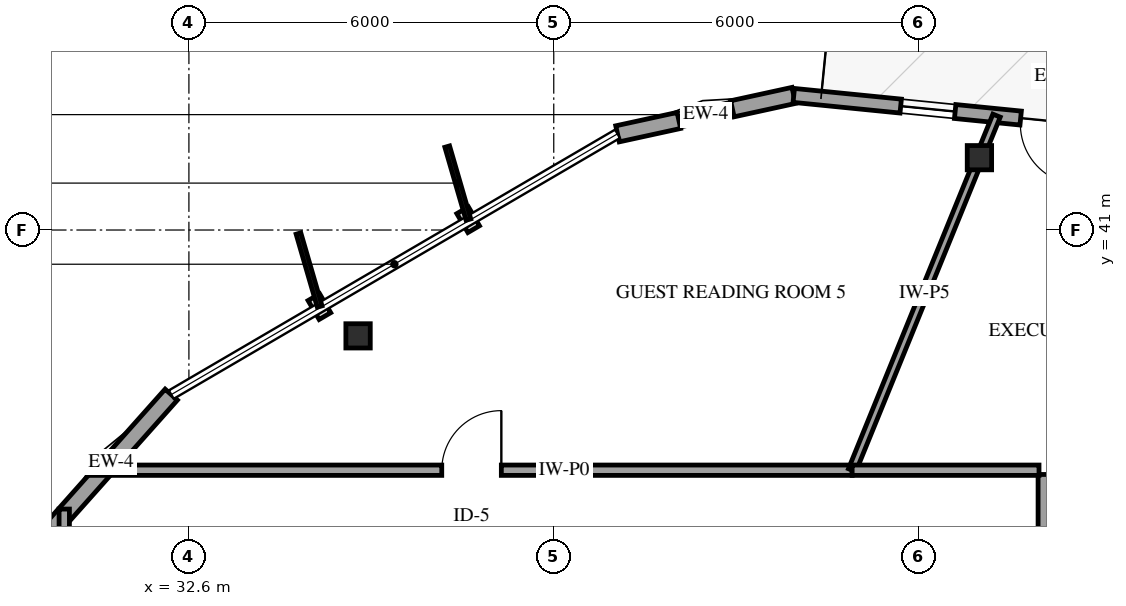
"""IFC4 building model, lengths in metres.
Left out: names, types, materials, properties, quantities, classifications, styles, units other than length and angle.
Written with IfcOpenShell. Run it as: python <this file> out.ifc"""

import sys

from ifc_helpers import new_model, si_unit, direction, frame, frame_2d, origin, origin_2d, place, context, subcontext, project, spatial, rectangle, i_section, extrude, element, fill, save


model = new_model("IFC4")
c1 = context("Model", 3, precision=1e-05, world=origin(), true_north=direction((0.0, 1.0)))
c2 = subcontext(c1, "Body", "Model", "MODEL_VIEW")
j1 = project(units=[si_unit("LENGTHUNIT", "METRE"), si_unit("PLANEANGLEUNIT", "RADIAN")], contexts=[c1])
p1 = place(None, origin())
s1 = spatial("IfcSite", under=j1, at=p1, CompositionType="ELEMENT")
p2 = place(p1, origin())
s2 = spatial("IfcBuilding", under=s1, at=p2, CompositionType="ELEMENT")
p3 = place(p2, frame((0.0, 0.0, 276.25)))
s3 = spatial("IfcBuildingStorey", under=s2, at=p3, CompositionType="ELEMENT", Elevation=276.25)
for number, where, z_axis, x_axis in (
    (1, (45.6, 42.189, 0.0), (0.0, 0.0, 1.0), (1.0, 0.0, 0.0)),
    (2, (35.382, 39.26, 0.0), (0.0, 0.0, 1.0), (1.0, 0.0, 0.0)),
):
    element("IfcColumn", number, at=place(p3, frame(where, z_axis=z_axis, x_axis=x_axis)), inside=s3, PredefinedType="COLUMN", context=c2, shape_type="SweptSolid", body=[
        extrude(i_section(OverallWidth=0.401, OverallDepth=0.399, WebThickness=0.025, FlangeThickness=0.04, FilletRadius=0.038, at=origin_2d()), origin(), (0.0, 0.0, 1.0), 3.75),
    ])
p4 = place(p3, frame((42.547, 43.214, 0.0), z_axis=(0.0, 0.0, 1.0), x_axis=(-0.977037259255, -0.21306851956, 0.0)))
e3 = element("IfcWall", 3, at=p4, inside=s3, PredefinedType="SOLIDWALL", context=c2, shape_type="SweptSolid", body=[
    extrude(rectangle(XDim=2.967, YDim=0.27, at=frame_2d((1.483, 0.0))), origin(), (0.0, 0.0, 1.0), 2.829),
])
p5 = place(p4, frame((1.033, 0.0, 0.75)))
e4 = element("IfcOpeningElement", 4, at=p5, cuts=e3, PredefinedType="OPENING", context=c2, shape_type="SweptSolid", body=[
    extrude(rectangle(XDim=0.9, YDim=1.5, at=frame_2d((0.45, 0.75))), frame((0.0, 0.145, 0.0), z_axis=(0.0, -1.0, 0.0), x_axis=(1.0, 0.0, 0.0)), (0.0, 0.0, 1.0), 0.29),
])
p6 = place(p3, frame((51.005, 42.369, 0.0), z_axis=(0.0, 0.0, 1.0), x_axis=(-0.995055090482, 0.099324553384, 0.0)))
e5 = element("IfcWall", 5, at=p6, inside=s3, PredefinedType="SOLIDWALL", context=c2, shape_type="SweptSolid", body=[
    extrude(rectangle(XDim=8.5, YDim=0.23, at=frame_2d((4.25, 0.0))), origin(), (0.0, 0.0, 1.0), 2.829),
])
p7 = place(p6, frame((3.75, 0.0, 0.0)))
e6 = element("IfcOpeningElement", 6, at=p7, cuts=e5, PredefinedType="OPENING", context=c2, shape_type="SweptSolid", body=[
    extrude(rectangle(XDim=1.0, YDim=2.15, at=frame_2d((0.5, 1.075))), frame((0.0, 0.125, 0.0), z_axis=(0.0, -1.0, 0.0), x_axis=(1.0, 0.0, 0.0)), (0.0, 0.0, 1.0), 0.25),
])
p8 = place(p6, frame((0.44, 0.0, 0.72)))
e7 = element("IfcOpeningElement", 7, at=p8, cuts=e5, PredefinedType="OPENING", context=c2, shape_type="SweptSolid", body=[
    extrude(rectangle(XDim=0.9, YDim=1.5, at=frame_2d((0.45, 0.75))), frame((0.0, 0.125, 0.0), z_axis=(0.0, -1.0, 0.0), x_axis=(1.0, 0.0, 0.0)), (0.0, 0.0, 1.0), 0.25),
])
p9 = place(p6, frame((5.833, 0.0, 0.72)))
e8 = element("IfcOpeningElement", 8, at=p9, cuts=e5, PredefinedType="OPENING", context=c2, shape_type="SweptSolid", body=[
    extrude(rectangle(XDim=0.9, YDim=1.5, at=frame_2d((0.45, 0.75))), frame((0.0, 0.125, 0.0), z_axis=(0.0, -1.0, 0.0), x_axis=(1.0, 0.0, 0.0)), (0.0, 0.0, 1.0), 0.25),
])
p10 = place(p3, frame((32.31, 38.293, 0.0), z_axis=(0.0, 0.0, 1.0), x_axis=(-0.665241909174, -0.746627887424, 0.0)))
e9 = element("IfcWall", 9, at=p10, inside=s3, PredefinedType="SOLIDWALL", context=c2, shape_type="SweptSolid", body=[
    extrude(rectangle(XDim=2.967, YDim=0.27, at=frame_2d((1.483, 0.0))), origin(), (0.0, 0.0, 1.0), 2.829),
])
p11 = place(p3, frame((30.55, 13.927, 0.0), z_axis=(0.0, 0.0, 1.0), x_axis=(0.0, 1.0, 0.0)))
e10 = element("IfcWall", 10, at=p11, inside=s3, PredefinedType="PARTITIONING", context=c2, shape_type="SweptSolid", body=[
    extrude(rectangle(XDim=22.484, YDim=0.17, at=frame_2d((11.242, 0.0))), origin(), (0.0, 0.0, 1.0), 3.45),
])
p12 = place(p11, frame((10.767, 0.0, 0.0)))
e11 = element("IfcOpeningElement", 11, at=p12, cuts=e10, PredefinedType="OPENING", context=c2, shape_type="SweptSolid", body=[
    extrude(rectangle(XDim=0.98, YDim=2.15, at=frame_2d((0.49, 1.075))), frame((0.0, 0.095, 0.0), z_axis=(0.0, -1.0, 0.0), x_axis=(1.0, 0.0, 0.0)), (0.0, 0.0, 1.0), 0.19),
])
p13 = place(p3, frame((30.96, 37.05, 0.0), z_axis=(0.0, 0.0, 1.0), x_axis=(1.0, 0.0, 0.0)))
e12 = element("IfcWall", 12, at=p13, inside=s3, PredefinedType="PARTITIONING", context=c2, shape_type="SweptSolid", body=[
    extrude(rectangle(XDim=12.547, YDim=0.17, at=frame_2d((6.273, 0.0))), origin(), (0.0, 0.0, 1.0), 3.45),
])
p14 = place(p13, frame((5.798, 0.0, 0.0)))
e13 = element("IfcOpeningElement", 13, at=p14, cuts=e12, PredefinedType="OPENING", context=c2, shape_type="SweptSolid", body=[
    extrude(rectangle(XDim=0.98, YDim=2.15, at=frame_2d((0.49, 1.075))), frame((0.0, 0.095, 0.0), z_axis=(0.0, -1.0, 0.0), x_axis=(1.0, 0.0, 0.0)), (0.0, 0.0, 1.0), 0.19),
])
p15 = place(p3, frame((43.507, 37.05, 0.0), z_axis=(0.0, 0.0, 1.0), x_axis=(0.377213129566, 0.92612647888, 0.0)))
e14 = element("IfcWall", 14, at=p15, inside=s3, PredefinedType="PARTITIONING", context=c2, shape_type="SweptSolid", body=[
    extrude(rectangle(XDim=6.296, YDim=0.13, at=frame_2d((3.148, 0.0))), origin(), (0.0, 0.0, 1.0), 2.745),
])
p16 = place(p3, frame((46.65, 36.98, 0.0), z_axis=(0.0, 0.0, 1.0), x_axis=(0.0, -1.0, 0.0)))
e15 = element("IfcWall", 15, at=p16, inside=s3, PredefinedType="PARTITIONING", context=c2, shape_type="SweptSolid", body=[
    extrude(rectangle(XDim=3.41, YDim=0.17, at=frame_2d((1.705, 0.0))), origin(), (0.0, 0.0, 1.0), 3.45),
])
p17 = place(p16, frame((1.23, 0.0, 0.0)))
e16 = element("IfcOpeningElement", 16, at=p17, cuts=e15, PredefinedType="OPENING", context=c2, shape_type="SweptSolid", body=[
    extrude(rectangle(XDim=0.98, YDim=2.15, at=frame_2d((0.49, 1.075))), frame((0.0, 0.095, 0.0), z_axis=(0.0, -1.0, 0.0), x_axis=(1.0, 0.0, 0.0)), (0.0, 0.0, 1.0), 0.19),
])
p18 = place(p3, frame((43.507, 37.05, 0.0), z_axis=(0.0, 0.0, 1.0), x_axis=(1.0, 0.0, 0.0)))
e17 = element("IfcWall", 17, at=p18, inside=s3, PredefinedType="PARTITIONING", context=c2, shape_type="SweptSolid", body=[
    extrude(rectangle(XDim=3.073, YDim=0.17, at=frame_2d((1.537, 0.0))), origin(), (0.0, 0.0, 1.0), 3.45),
])
p19 = place(p5, origin())
e18 = element("IfcWindow", 18, at=p19, inside=s3, PartitioningType="SINGLE_PANEL", PredefinedType="WINDOW", context=c2, shape_type="SweptSolid", body=[
    extrude(rectangle(XDim=0.9, YDim=1.5, at=frame_2d((0.45, 0.75))), frame((0.0, 0.03, 0.0), z_axis=(0.0, -1.0, 0.0), x_axis=(1.0, 0.0, 0.0)), (0.0, 0.0, 1.0), 0.06),
])
fill(e4, e18)
p20 = place(p7, origin())
e19 = element("IfcDoor", 19, at=p20, inside=s3, OperationType="SINGLE_SWING_LEFT", PredefinedType="DOOR", context=c2, shape_type="SweptSolid", body=[
    extrude(rectangle(XDim=1.0, YDim=2.15, at=frame_2d((0.5, 1.075))), frame((0.0, 0.025, 0.0), z_axis=(0.0, -1.0, 0.0), x_axis=(1.0, 0.0, 0.0)), (0.0, 0.0, 1.0), 0.05),
])
fill(e6, e19)
p21 = place(p9, origin())
e20 = element("IfcWindow", 20, at=p21, inside=s3, PartitioningType="SINGLE_PANEL", PredefinedType="WINDOW", context=c2, shape_type="SweptSolid", body=[
    extrude(rectangle(XDim=0.9, YDim=1.5, at=frame_2d((0.45, 0.75))), frame((0.0, 0.03, 0.0), z_axis=(0.0, -1.0, 0.0), x_axis=(1.0, 0.0, 0.0)), (0.0, 0.0, 1.0), 0.06),
])
fill(e8, e20)
p22 = place(p14, origin())
e21 = element("IfcDoor", 21, at=p22, inside=s3, OperationType="SINGLE_SWING_RIGHT", PredefinedType="DOOR", context=c2, shape_type="SweptSolid", body=[
    extrude(rectangle(XDim=0.98, YDim=2.15, at=frame_2d((0.49, 1.075))), frame((0.0, 0.025, 0.0), z_axis=(0.0, -1.0, 0.0), x_axis=(1.0, 0.0, 0.0)), (0.0, 0.0, 1.0), 0.05),
])
fill(e13, e21)
save(model, sys.argv[1])
